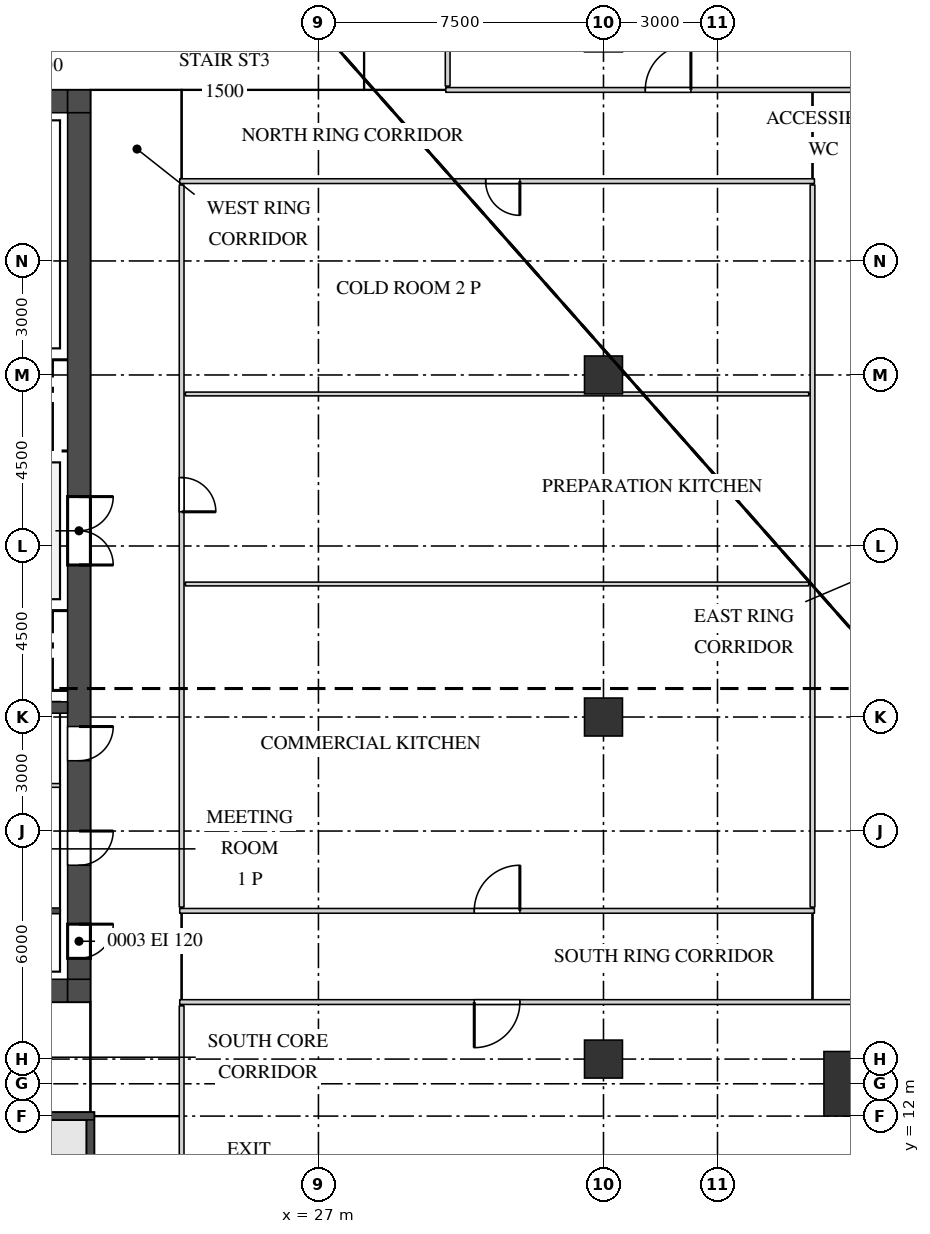
"""IFC4 building model, lengths in metres.
Left out: names, types, materials, properties, quantities, classifications, styles, units other than length and angle.
Written with IfcOpenShell. Run it as: python <this file> out.ifc"""

import sys

from ifc_helpers import new_model, si_unit, direction, frame, frame_2d, origin, origin_2d, place, context, subcontext, project, spatial, rectangle, extrude, source, transform, mapped, element, fill, save


model = new_model("IFC4")
c1 = context("Model", 3, precision=1e-05, world=origin(), true_north=direction((0.0, 1.0)))
c2 = subcontext(c1, "Body", "Model", "MODEL_VIEW")
j1 = project(units=[si_unit("LENGTHUNIT", "METRE"), si_unit("PLANEANGLEUNIT", "RADIAN")], contexts=[c1])
p1 = place(None, origin())
s1 = spatial("IfcSite", under=j1, at=p1, CompositionType="ELEMENT")
p2 = place(p1, origin())
s2 = spatial("IfcBuilding", under=s1, at=p2, CompositionType="ELEMENT")
p3 = place(p2, frame((0.0, 0.0, 306.2)))
s3 = spatial("IfcBuildingStorey", under=s2, at=p3, CompositionType="ELEMENT", Elevation=306.2)
m1 = source(origin(), c2, "Body", "SweptSolid", [
    extrude(rectangle(XDim=14.4, YDim=0.6, at=frame_2d((7.2, 0.0))), origin(), (0.0, 0.0, 1.0), 3.75),
])
p4 = place(p3, frame((6.0, 38.7, 0.0), z_axis=(0.0, 0.0, 1.0), x_axis=(1.0, 0.0, 0.0)))
e1 = element("IfcWall", 1, at=p4, inside=s3, PredefinedType="SHEAR", context=c2, shape_type="MappedRepresentation", body=[
    mapped(m1, transform((0.0, 0.0, 0.0))),
])
m2 = source(origin(), c2, "Body", "SweptSolid", [
    extrude(rectangle(XDim=0.9, YDim=2.1, at=frame_2d((0.45, 1.05))), frame((0.0, 0.31, 0.0), z_axis=(0.0, -1.0, 0.0), x_axis=(1.0, 0.0, 0.0)), (0.0, 0.0, 1.0), 0.62),
])
p5 = place(p4, frame((3.7, 0.0, 0.0)))
e2 = element("IfcOpeningElement", 2, at=p5, cuts=e1, PredefinedType="OPENING", context=c2, shape_type="MappedRepresentation", body=[
    mapped(m2, transform((0.0, 0.0, 0.0))),
])
p6 = place(p4, frame((10.4, 0.0, 0.0)))
e3 = element("IfcOpeningElement", 3, at=p6, cuts=e1, PredefinedType="OPENING", context=c2, shape_type="MappedRepresentation", body=[
    mapped(m2, transform((0.0, 0.0, 0.0))),
])
m3 = source(origin(), c2, "Body", "SweptSolid", [
    extrude(rectangle(XDim=0.6, YDim=0.6, at=frame_2d((0.3, 0.0))), origin(), (0.0, 0.0, 1.0), 3.75),
])
p7 = place(p3, frame((20.4, 38.7, 0.0), z_axis=(0.0, 0.0, 1.0), x_axis=(1.0, 0.0, 0.0)))
e4 = element("IfcWall", 4, at=p7, inside=s3, PredefinedType="SHEAR", context=c2, shape_type="MappedRepresentation", body=[
    mapped(m3, transform((0.0, 0.0, 0.0))),
])
p8 = place(p3, frame((6.0, 15.3, 0.0), z_axis=(0.0, 0.0, 1.0), x_axis=(1.0, 0.0, 0.0)))
e5 = element("IfcWall", 5, at=p8, inside=s3, PredefinedType="SHEAR", context=c2, shape_type="MappedRepresentation", body=[
    mapped(m1, transform((0.0, 0.0, 0.0))),
])
m4 = source(origin(), c2, "Body", "SweptSolid", [
    extrude(rectangle(XDim=1.2, YDim=2.1, at=frame_2d((0.6, 1.05))), frame((0.0, 0.31, 0.0), z_axis=(0.0, -1.0, 0.0), x_axis=(1.0, 0.0, 0.0)), (0.0, 0.0, 1.0), 0.62),
])
p9 = place(p8, frame((6.2, 0.0, 0.0)))
e6 = element("IfcOpeningElement", 6, at=p9, cuts=e5, PredefinedType="OPENING", context=c2, shape_type="MappedRepresentation", body=[
    mapped(m4, transform((0.0, 0.0, 0.0))),
])
p10 = place(p8, frame((2.85, 0.0, 0.0)))
e7 = element("IfcOpeningElement", 7, at=p10, cuts=e5, PredefinedType="OPENING", context=c2, shape_type="MappedRepresentation", body=[
    mapped(m4, transform((0.0, 0.0, 0.0))),
])
m5 = source(origin(), c2, "Body", "SweptSolid", [
    extrude(rectangle(XDim=1.0, YDim=2.1, at=frame_2d((0.5, 1.05))), frame((0.0, 0.31, 0.0), z_axis=(0.0, -1.0, 0.0), x_axis=(1.0, 0.0, 0.0)), (0.0, 0.0, 1.0), 0.62),
])
p11 = place(p8, frame((8.7, 0.0, 0.0)))
e8 = element("IfcOpeningElement", 8, at=p11, cuts=e5, PredefinedType="OPENING", context=c2, shape_type="MappedRepresentation", body=[
    mapped(m5, transform((0.0, 0.0, 0.0))),
])
p12 = place(p3, frame((20.4, 15.3, 0.0), z_axis=(0.0, 0.0, 1.0), x_axis=(1.0, 0.0, 0.0)))
e9 = element("IfcWall", 9, at=p12, inside=s3, PredefinedType="SHEAR", context=c2, shape_type="MappedRepresentation", body=[
    mapped(m3, transform((0.0, 0.0, 0.0))),
])
m6 = source(origin(), c2, "Body", "SweptSolid", [
    extrude(rectangle(XDim=22.8, YDim=0.6, at=frame_2d((11.4, 0.0))), origin(), (0.0, 0.0, 1.0), 3.75),
])
p13 = place(p3, frame((20.7, 15.6, 0.0), z_axis=(0.0, 0.0, 1.0), x_axis=(0.0, 1.0, 0.0)))
e10 = element("IfcWall", 10, at=p13, inside=s3, PredefinedType="SHEAR", context=c2, shape_type="MappedRepresentation", body=[
    mapped(m6, transform((0.0, 0.0, 0.0))),
])
m7 = source(origin(), c2, "Body", "SweptSolid", [
    extrude(rectangle(XDim=1.8, YDim=2.1, at=frame_2d((0.9, 1.05))), frame((0.0, 0.31, 0.0), z_axis=(0.0, -1.0, 0.0), x_axis=(1.0, 0.0, 0.0)), (0.0, 0.0, 1.0), 0.62),
])
p14 = place(p13, frame((10.9, 0.0, 0.0)))
e11 = element("IfcOpeningElement", 11, at=p14, cuts=e10, PredefinedType="OPENING", context=c2, shape_type="MappedRepresentation", body=[
    mapped(m7, transform((0.0, 0.0, 0.0))),
])
p15 = place(p13, frame((0.55, 0.0, 0.0)))
e12 = element("IfcOpeningElement", 12, at=p15, cuts=e10, PredefinedType="OPENING", context=c2, shape_type="MappedRepresentation", body=[
    mapped(m2, transform((0.0, 0.0, 0.0))),
])
p16 = place(p13, frame((3.0, 0.0, 0.0)))
e13 = element("IfcOpeningElement", 13, at=p16, cuts=e10, PredefinedType="OPENING", context=c2, shape_type="MappedRepresentation", body=[
    mapped(m2, transform((0.0, 0.0, 0.0))),
])
p17 = place(p13, frame((5.75, 0.0, 0.0)))
e14 = element("IfcOpeningElement", 14, at=p17, cuts=e10, PredefinedType="OPENING", context=c2, shape_type="MappedRepresentation", body=[
    mapped(m2, transform((0.0, 0.0, 0.0))),
])
m8 = source(origin(), c2, "Body", "SweptSolid", [
    extrude(rectangle(XDim=7.2, YDim=0.2, at=frame_2d((3.6, 0.0))), origin(), (0.0, 0.0, 1.0), 3.75),
])
p18 = place(p3, frame((13.9, 12.0, 0.0), z_axis=(0.0, 0.0, 1.0), x_axis=(1.0, 0.0, 0.0)))
e15 = element("IfcWall", 15, at=p18, inside=s3, PredefinedType="SHEAR", context=c2, shape_type="MappedRepresentation", body=[
    mapped(m8, transform((0.0, 0.0, 0.0))),
])
m9 = source(origin(), c2, "Body", "SweptSolid", [
    extrude(rectangle(XDim=3.35, YDim=0.2, at=frame_2d((1.675, 0.0))), origin(), (0.0, 0.0, 1.0), 3.75),
])
p19 = place(p3, frame((21.0, 8.55, 0.0), z_axis=(0.0, 0.0, 1.0), x_axis=(0.0, 1.0, 0.0)))
e16 = element("IfcWall", 16, at=p19, inside=s3, PredefinedType="SHEAR", context=c2, shape_type="MappedRepresentation", body=[
    mapped(m9, transform((0.0, 0.0, 0.0))),
])
m10 = source(origin(), c2, "Body", "SweptSolid", [
    extrude(rectangle(XDim=13.2, YDim=0.3, at=frame_2d((6.6, 0.0))), origin(), (0.0, 0.0, 1.0), 3.75),
])
p20 = place(p3, frame((7.2, 22.75, 0.0), z_axis=(0.0, 0.0, 1.0), x_axis=(1.0, 0.0, 0.0)))
e17 = element("IfcWall", 17, at=p20, inside=s3, PredefinedType="STANDARD", context=c2, shape_type="MappedRepresentation", body=[
    mapped(m10, transform((0.0, 0.0, 0.0))),
])
m11 = source(origin(), c2, "Body", "SweptSolid", [
    extrude(rectangle(XDim=1.7, YDim=1.7, at=origin_2d()), origin(), (0.0, 0.0, 1.0), 3.75),
])
p21 = place(p3, frame((41.15, 12.85, 0.0), z_axis=(0.0, 0.0, 1.0), x_axis=(1.0, 0.0, 0.0)))
e18 = element("IfcColumn", 18, at=p21, inside=s3, PredefinedType="COLUMN", context=c2, shape_type="MappedRepresentation", body=[
    mapped(m11, transform((0.0, 0.0, 0.0))),
])
m12 = source(origin(), c2, "Body", "SweptSolid", [
    extrude(rectangle(XDim=1.0, YDim=1.0, at=origin_2d()), origin(), (0.0, 0.0, 1.0), 3.75),
])
for number, where, z_axis, x_axis in (
    (19, (34.5, 13.5, 0.0), (0.0, 0.0, 1.0), (1.0, 0.0, 0.0)),
    (20, (34.5, 22.5, 0.0), (0.0, 0.0, 1.0), (1.0, 0.0, 0.0)),
    (21, (34.5, 31.5, 0.0), (0.0, 0.0, 1.0), (1.0, 0.0, 0.0)),
):
    element("IfcColumn", number, at=place(p3, frame(where, z_axis=z_axis, x_axis=x_axis)), inside=s3, PredefinedType="COLUMN", context=c2, shape_type="MappedRepresentation", body=[
        mapped(m12, transform((0.0, 0.0, 0.0))),
    ])
m13 = source(origin(), c2, "Body", "SweptSolid", [
    extrude(rectangle(XDim=8.75, YDim=0.125, at=frame_2d((4.375, 0.0))), origin(), (0.0, 0.0, 1.0), 3.8),
])
p22 = place(p3, frame((23.4, 6.15, 0.0), z_axis=(0.0, 0.0, 1.0), x_axis=(0.0, 1.0, 0.0)))
e22 = element("IfcWall", 22, at=p22, inside=s3, PredefinedType="PARTITIONING", context=c2, shape_type="MappedRepresentation", body=[
    mapped(m13, transform((0.0, 0.0, 0.0))),
])
m14 = source(origin(), c2, "Body", "SweptSolid", [
    extrude(rectangle(XDim=19.1, YDim=0.125, at=frame_2d((9.55, 0.0))), origin(), (0.0, 0.0, 1.0), 3.8),
])
p23 = place(p3, frame((23.35, 15.0, 0.0), z_axis=(0.0, 0.0, 1.0), x_axis=(1.0, 0.0, 0.0)))
e23 = element("IfcWall", 23, at=p23, inside=s3, PredefinedType="PARTITIONING", context=c2, shape_type="MappedRepresentation", body=[
    mapped(m14, transform((0.0, 0.0, 0.0))),
])
m15 = source(origin(), c2, "Body", "SweptSolid", [
    extrude(rectangle(XDim=1.2, YDim=2.1, at=frame_2d((0.6, 1.05))), frame((0.0, 0.073, 0.0), z_axis=(0.0, -1.0, 0.0), x_axis=(1.0, 0.0, 0.0)), (0.0, 0.0, 1.0), 0.145),
])
p24 = place(p23, frame((7.75, 0.0, 0.0)))
e24 = element("IfcOpeningElement", 24, at=p24, cuts=e23, PredefinedType="OPENING", context=c2, shape_type="MappedRepresentation", body=[
    mapped(m15, transform((0.0, 0.0, 0.0))),
])
m16 = source(origin(), c2, "Body", "SweptSolid", [
    extrude(rectangle(XDim=4.0, YDim=0.15, at=frame_2d((2.0, 0.0))), origin(), (0.0, 0.0, 1.0), 3.8),
])
p25 = place(p3, frame((16.2, 17.4, 0.0), z_axis=(0.0, 0.0, 1.0), x_axis=(1.0, 0.0, 0.0)))
e25 = element("IfcWall", 25, at=p25, inside=s3, PredefinedType="PARTITIONING", context=c2, shape_type="MappedRepresentation", body=[
    mapped(m16, transform((0.0, 0.0, 0.0))),
])
m17 = source(origin(), c2, "Body", "SweptSolid", [
    extrude(rectangle(XDim=16.7, YDim=0.125, at=frame_2d((8.35, 0.0))), origin(), (0.0, 0.0, 1.0), 3.8),
])
p26 = place(p3, frame((23.35, 17.4, 0.0), z_axis=(0.0, 0.0, 1.0), x_axis=(1.0, 0.0, 0.0)))
e26 = element("IfcWall", 26, at=p26, inside=s3, PredefinedType="PARTITIONING", context=c2, shape_type="MappedRepresentation", body=[
    mapped(m17, transform((0.0, 0.0, 0.0))),
])
p27 = place(p26, frame((7.75, 0.0, 0.0)))
e27 = element("IfcOpeningElement", 27, at=p27, cuts=e26, PredefinedType="OPENING", context=c2, shape_type="MappedRepresentation", body=[
    mapped(m15, transform((0.0, 0.0, 0.0))),
])
m18 = source(origin(), c2, "Body", "SweptSolid", [
    extrude(rectangle(XDim=19.0, YDim=0.125, at=frame_2d((9.5, 0.0))), origin(), (0.0, 0.0, 1.0), 3.8),
])
p28 = place(p3, frame((23.4, 17.5, 0.0), z_axis=(0.0, 0.0, 1.0), x_axis=(0.0, 1.0, 0.0)))
e28 = element("IfcWall", 28, at=p28, inside=s3, PredefinedType="PARTITIONING", context=c2, shape_type="MappedRepresentation", body=[
    mapped(m18, transform((0.0, 0.0, 0.0))),
])
m19 = source(origin(), c2, "Body", "SweptSolid", [
    extrude(rectangle(XDim=0.9, YDim=2.1, at=frame_2d((0.45, 1.05))), frame((0.0, 0.073, 0.0), z_axis=(0.0, -1.0, 0.0), x_axis=(1.0, 0.0, 0.0)), (0.0, 0.0, 1.0), 0.145),
])
p29 = place(p28, frame((10.4, 0.0, 0.0)))
e29 = element("IfcOpeningElement", 29, at=p29, cuts=e28, PredefinedType="OPENING", context=c2, shape_type="MappedRepresentation", body=[
    mapped(m19, transform((0.0, 0.0, 0.0))),
])
p30 = place(p3, frame((40.0, 17.5, 0.0), z_axis=(0.0, 0.0, 1.0), x_axis=(0.0, 1.0, 0.0)))
e30 = element("IfcWall", 30, at=p30, inside=s3, PredefinedType="PARTITIONING", context=c2, shape_type="MappedRepresentation", body=[
    mapped(m18, transform((0.0, 0.0, 0.0))),
])
m20 = source(origin(), c2, "Body", "SweptSolid", [
    extrude(rectangle(XDim=4.1, YDim=0.1, at=frame_2d((2.05, 0.0))), origin(), (0.0, 0.0, 1.0), 3.8),
])
p31 = place(p3, frame((16.1, 20.7, 0.0), z_axis=(0.0, 0.0, 1.0), x_axis=(1.0, 0.0, 0.0)))
e31 = element("IfcWall", 31, at=p31, inside=s3, PredefinedType="PARTITIONING", context=c2, shape_type="MappedRepresentation", body=[
    mapped(m20, transform((0.0, 0.0, 0.0))),
])
m21 = source(origin(), c2, "Body", "SweptSolid", [
    extrude(rectangle(XDim=16.4, YDim=0.1, at=frame_2d((8.2, 0.0))), origin(), (0.0, 0.0, 1.0), 3.8),
])
for number, where, z_axis, x_axis in (
    (32, (23.5, 26.0, 0.0), (0.0, 0.0, 1.0), (1.0, 0.0, 0.0)),
    (33, (23.5, 31.0, 0.0), (0.0, 0.0, 1.0), (1.0, 0.0, 0.0)),
):
    element("IfcWall", number, at=place(p3, frame(where, z_axis=z_axis, x_axis=x_axis)), inside=s3, PredefinedType="PARTITIONING", context=c2, shape_type="MappedRepresentation", body=[
        mapped(m21, transform((0.0, 0.0, 0.0))),
    ])
p32 = place(p3, frame((23.35, 36.6, 0.0), z_axis=(0.0, 0.0, 1.0), x_axis=(1.0, 0.0, 0.0)))
e34 = element("IfcWall", 34, at=p32, inside=s3, PredefinedType="PARTITIONING", context=c2, shape_type="MappedRepresentation", body=[
    mapped(m17, transform((0.0, 0.0, 0.0))),
])
p33 = place(p32, frame((8.05, 0.0, 0.0)))
e35 = element("IfcOpeningElement", 35, at=p33, cuts=e34, PredefinedType="OPENING", context=c2, shape_type="MappedRepresentation", body=[
    mapped(m19, transform((0.0, 0.0, 0.0))),
])
m22 = source(origin(), c2, "Body", "SweptSolid", [
    extrude(rectangle(XDim=12.1, YDim=0.125, at=frame_2d((6.05, 0.0))), origin(), (0.0, 0.0, 1.0), 3.8),
])
p34 = place(p3, frame((30.35, 39.0, 0.0), z_axis=(0.0, 0.0, 1.0), x_axis=(1.0, 0.0, 0.0)))
e36 = element("IfcWall", 36, at=p34, inside=s3, PredefinedType="PARTITIONING", context=c2, shape_type="MappedRepresentation", body=[
    mapped(m22, transform((0.0, 0.0, 0.0))),
])
p35 = place(p34, frame((5.25, 0.0, 0.0)))
e37 = element("IfcOpeningElement", 37, at=p35, cuts=e36, PredefinedType="OPENING", context=c2, shape_type="MappedRepresentation", body=[
    mapped(m15, transform((0.0, 0.0, 0.0))),
])
p36 = place(p3, frame((30.4, 39.1, 0.0), z_axis=(0.0, 0.0, 1.0), x_axis=(0.0, 1.0, 0.0)))
e38 = element("IfcWall", 38, at=p36, inside=s3, PredefinedType="PARTITIONING", context=c2, shape_type="MappedRepresentation", body=[
    mapped(m13, transform((0.0, 0.0, 0.0))),
])
m23 = source(origin(), c2, "Body", "SweptSolid", [
    extrude(rectangle(XDim=1.8, YDim=2.1, at=frame_2d((0.9, 1.05))), frame((0.0, 0.25, 0.0), z_axis=(0.0, -1.0, 0.0), x_axis=(1.0, 0.0, 0.0)), (0.0, 0.0, 1.0), 0.5),
])
p37 = place(p14, origin())
e39 = element("IfcDoor", 39, at=p37, inside=s3, OperationType="DOUBLE_DOOR_SINGLE_SWING", PredefinedType="DOOR", context=c2, shape_type="MappedRepresentation", body=[
    mapped(m23, transform((0.0, 0.0, 0.0))),
])
fill(e11, e39)
m24 = source(origin(), c2, "Body", "SweptSolid", [
    extrude(rectangle(XDim=0.9, YDim=2.1, at=frame_2d((0.45, 1.05))), frame((0.0, 0.25, 0.0), z_axis=(0.0, -1.0, 0.0), x_axis=(1.0, 0.0, 0.0)), (0.0, 0.0, 1.0), 0.5),
])
p38 = place(p15, origin())
e40 = element("IfcDoor", 40, at=p38, inside=s3, OperationType="SINGLE_SWING_RIGHT", PredefinedType="DOOR", context=c2, shape_type="MappedRepresentation", body=[
    mapped(m24, transform((0.0, 0.0, 0.0))),
])
fill(e12, e40)
p39 = place(p16, origin())
e41 = element("IfcDoor", 41, at=p39, inside=s3, OperationType="SINGLE_SWING_RIGHT", PredefinedType="DOOR", context=c2, shape_type="MappedRepresentation", body=[
    mapped(m24, transform((0.0, 0.0, 0.0))),
])
fill(e13, e41)
p40 = place(p17, origin())
e42 = element("IfcDoor", 42, at=p40, inside=s3, OperationType="SINGLE_SWING_RIGHT", PredefinedType="DOOR", context=c2, shape_type="MappedRepresentation", body=[
    mapped(m24, transform((0.0, 0.0, 0.0))),
])
fill(e14, e42)
m25 = source(origin(), c2, "Body", "SweptSolid", [
    extrude(rectangle(XDim=1.2, YDim=2.1, at=frame_2d((0.6, 1.05))), frame((0.0, 0.025, 0.0), z_axis=(0.0, -1.0, 0.0), x_axis=(1.0, 0.0, 0.0)), (0.0, 0.0, 1.0), 0.05),
])
p41 = place(p24, origin())
e43 = element("IfcDoor", 43, at=p41, inside=s3, OperationType="SINGLE_SWING_LEFT", PredefinedType="DOOR", context=c2, shape_type="MappedRepresentation", body=[
    mapped(m25, transform((0.0, 0.0, 0.0))),
])
fill(e24, e43)
p42 = place(p35, origin())
e44 = element("IfcDoor", 44, at=p42, inside=s3, OperationType="SINGLE_SWING_LEFT", PredefinedType="DOOR", context=c2, shape_type="MappedRepresentation", body=[
    mapped(m25, transform((0.0, 0.0, 0.0))),
])
fill(e37, e44)
p43 = place(p27, origin())
e45 = element("IfcDoor", 45, at=p43, inside=s3, OperationType="SINGLE_SWING_LEFT", PredefinedType="DOOR", context=c2, shape_type="MappedRepresentation", body=[
    mapped(m25, transform((0.0, 0.0, 0.0))),
])
fill(e27, e45)
m26 = source(origin(), c2, "Body", "SweptSolid", [
    extrude(rectangle(XDim=0.9, YDim=2.1, at=frame_2d((0.45, 1.05))), frame((0.0, 0.025, 0.0), z_axis=(0.0, -1.0, 0.0), x_axis=(1.0, 0.0, 0.0)), (0.0, 0.0, 1.0), 0.05),
])
p44 = place(p29, origin())
e46 = element("IfcDoor", 46, at=p44, inside=s3, OperationType="SINGLE_SWING_LEFT", PredefinedType="DOOR", context=c2, shape_type="MappedRepresentation", body=[
    mapped(m26, transform((0.0, 0.0, 0.0))),
])
fill(e29, e46)
p45 = place(p33, origin())
e47 = element("IfcDoor", 47, at=p45, inside=s3, OperationType="SINGLE_SWING_RIGHT", PredefinedType="DOOR", context=c2, shape_type="MappedRepresentation", body=[
    mapped(m26, transform((0.0, 0.0, 0.0))),
])
fill(e35, e47)
save(model, sys.argv[1])
